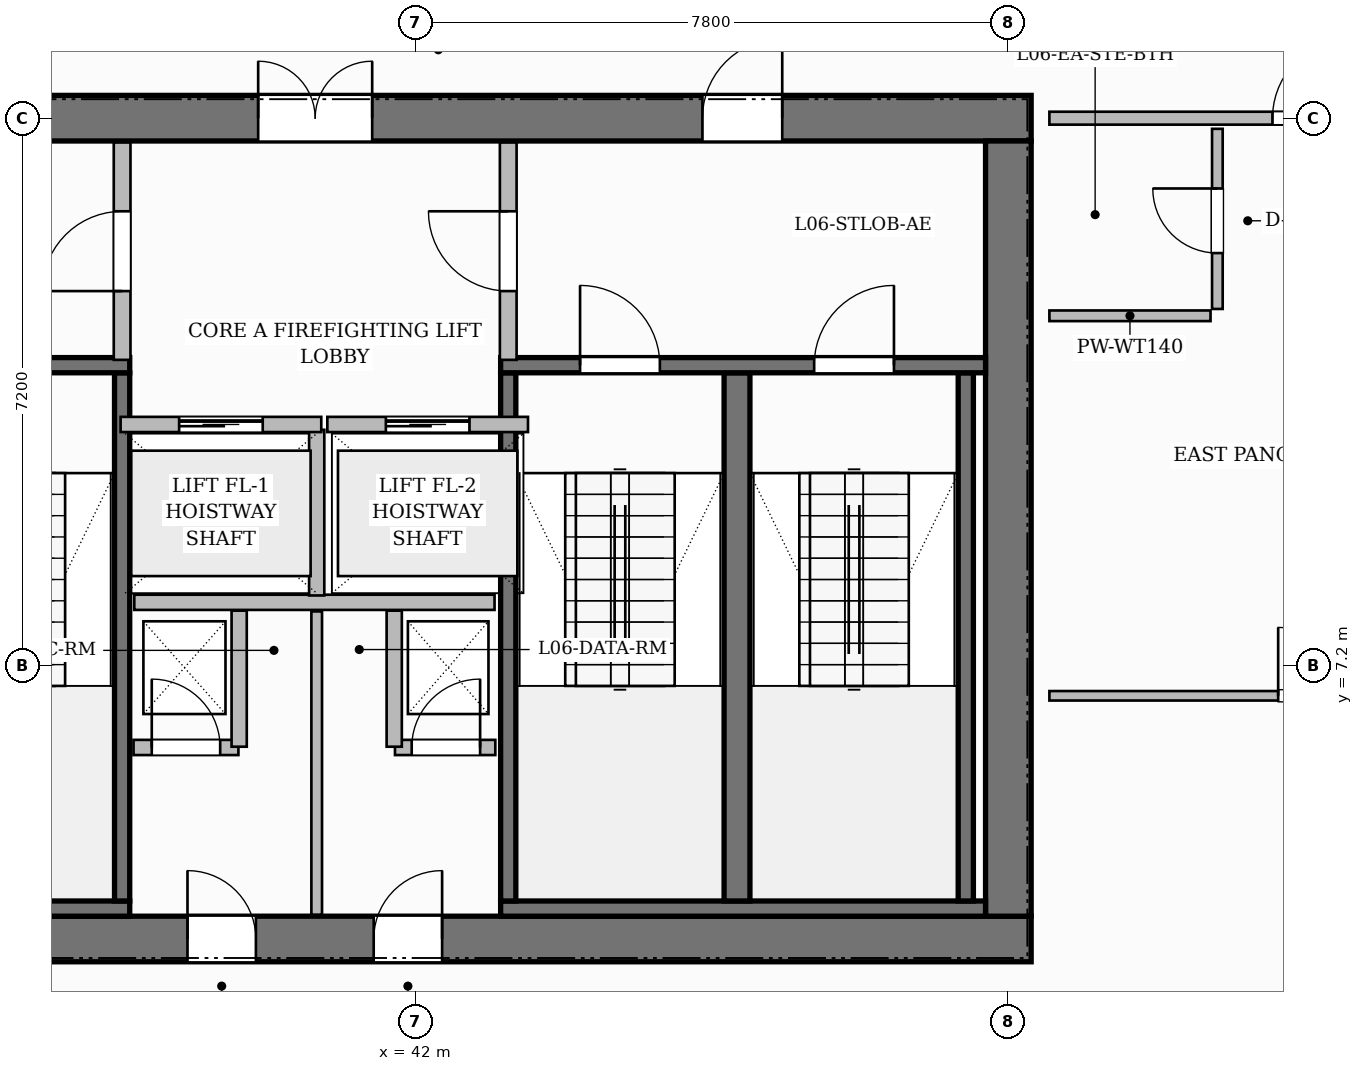
"""IFC4 building model, lengths in metres.
Left out: names, types, materials, properties, quantities, classifications, styles, units other than length and angle.
Written with IfcOpenShell. Run it as: python <this file> out.ifc"""

import sys

from ifc_helpers import new_model, si_unit, direction, frame, frame_2d, origin, place, context, subcontext, project, spatial, rectangle, extrude, source, transform, mapped, element, fill, save


model = new_model("IFC4")
c1 = context("Model", 3, precision=1e-05, world=origin(), true_north=direction((0.0, 1.0)))
c2 = subcontext(c1, "Body", "Model", "MODEL_VIEW")
j1 = project(units=[si_unit("LENGTHUNIT", "METRE"), si_unit("PLANEANGLEUNIT", "RADIAN")], contexts=[c1])
p1 = place(None, origin())
s1 = spatial("IfcSite", under=j1, at=p1, CompositionType="ELEMENT")
p2 = place(p1, origin())
s2 = spatial("IfcBuilding", under=s1, at=p2, CompositionType="ELEMENT")
p3 = place(p2, frame((0.0, 0.0, 32.4)))
s3 = spatial("IfcBuildingStorey", under=s2, at=p3, CompositionType="ELEMENT", Elevation=32.4)
p4 = place(p3, frame((34.5, 3.6, 0.0), z_axis=(0.0, 0.0, 1.0), x_axis=(1.0, 0.0, 0.0)))
e1 = element("IfcWall", 1, at=p4, inside=s3, PredefinedType="SHEAR", context=c2, shape_type="SweptSolid", body=[
    extrude(rectangle(XDim=15.6, YDim=0.6, at=frame_2d((7.8, 0.0))), origin(), (0.0, 0.0, 1.0), 3.7),
])
p5 = place(p4, frame((4.5, 0.0, 0.0)))
e2 = element("IfcOpeningElement", 2, at=p5, cuts=e1, PredefinedType="OPENING", context=c2, shape_type="SweptSolid", body=[
    extrude(rectangle(XDim=0.9, YDim=2.1, at=frame_2d((0.45, 1.05))), frame((0.0, 0.31, 0.0), z_axis=(0.0, -1.0, 0.0), x_axis=(1.0, 0.0, 0.0)), (0.0, 0.0, 1.0), 0.62),
])
p6 = place(p4, frame((6.95, 0.0, 0.0)))
e3 = element("IfcOpeningElement", 3, at=p6, cuts=e1, PredefinedType="OPENING", context=c2, shape_type="SweptSolid", body=[
    extrude(rectangle(XDim=0.9, YDim=2.1, at=frame_2d((0.45, 1.05))), frame((0.0, 0.31, 0.0), z_axis=(0.0, -1.0, 0.0), x_axis=(1.0, 0.0, 0.0)), (0.0, 0.0, 1.0), 0.62),
])
p7 = place(p3, frame((34.5, 14.4, 0.0), z_axis=(0.0, 0.0, 1.0), x_axis=(1.0, 0.0, 0.0)))
e4 = element("IfcWall", 4, at=p7, inside=s3, PredefinedType="SHEAR", context=c2, shape_type="SweptSolid", body=[
    extrude(rectangle(XDim=15.6, YDim=0.6, at=frame_2d((7.8, 0.0))), origin(), (0.0, 0.0, 1.0), 3.7),
])
p8 = place(p7, frame((5.43, 0.0, 0.0)))
e5 = element("IfcOpeningElement", 5, at=p8, cuts=e4, PredefinedType="OPENING", context=c2, shape_type="SweptSolid", body=[
    extrude(rectangle(XDim=1.5, YDim=2.2, at=frame_2d((0.75, 1.1))), frame((0.0, 0.31, 0.0), z_axis=(0.0, -1.0, 0.0), x_axis=(1.0, 0.0, 0.0)), (0.0, 0.0, 1.0), 0.62),
])
p9 = place(p7, frame((1.645, 0.0, 0.0)))
e6 = element("IfcOpeningElement", 6, at=p9, cuts=e4, PredefinedType="OPENING", context=c2, shape_type="SweptSolid", body=[
    extrude(rectangle(XDim=1.05, YDim=2.15, at=frame_2d((0.525, 1.075))), frame((0.0, 0.31, 0.0), z_axis=(0.0, -1.0, 0.0), x_axis=(1.0, 0.0, 0.0)), (0.0, 0.0, 1.0), 0.62),
])
p10 = place(p7, frame((11.275, 0.0, 0.0)))
e7 = element("IfcOpeningElement", 7, at=p10, cuts=e4, PredefinedType="OPENING", context=c2, shape_type="SweptSolid", body=[
    extrude(rectangle(XDim=1.05, YDim=2.15, at=frame_2d((0.525, 1.075))), frame((0.0, 0.31, 0.0), z_axis=(0.0, -1.0, 0.0), x_axis=(1.0, 0.0, 0.0)), (0.0, 0.0, 1.0), 0.62),
])
p11 = place(p3, frame((49.8, 3.9, 0.0), z_axis=(0.0, 0.0, 1.0), x_axis=(0.0, 1.0, 0.0)))
e8 = element("IfcWall", 8, at=p11, inside=s3, PredefinedType="SHEAR", context=c2, shape_type="SweptSolid", body=[
    extrude(rectangle(XDim=10.2, YDim=0.6, at=frame_2d((5.1, 0.0))), origin(), (0.0, 0.0, 1.0), 3.7),
])
p12 = place(p3, frame((35.1, 4.0, 0.0), z_axis=(0.0, 0.0, 1.0), x_axis=(1.0, 0.0, 0.0)))
e9 = element("IfcWall", 9, at=p12, inside=s3, PredefinedType="SHEAR", context=c2, shape_type="SweptSolid", body=[
    extrude(rectangle(XDim=3.14, YDim=0.2, at=frame_2d((1.57, 0.0))), origin(), (0.0, 0.0, 1.0), 3.7),
])
p13 = place(p3, frame((38.14, 4.1, 0.0), z_axis=(0.0, 0.0, 1.0), x_axis=(0.0, 1.0, 0.0)))
e10 = element("IfcWall", 10, at=p13, inside=s3, PredefinedType="SHEAR", context=c2, shape_type="SweptSolid", body=[
    extrude(rectangle(XDim=6.95, YDim=0.2, at=frame_2d((3.475, 0.0))), origin(), (0.0, 0.0, 1.0), 3.7),
])
p14 = place(p3, frame((35.1, 11.15, 0.0), z_axis=(0.0, 0.0, 1.0), x_axis=(1.0, 0.0, 0.0)))
e11 = element("IfcWall", 11, at=p14, inside=s3, PredefinedType="SHEAR", context=c2, shape_type="SweptSolid", body=[
    extrude(rectangle(XDim=3.14, YDim=0.2, at=frame_2d((1.57, 0.0))), origin(), (0.0, 0.0, 1.0), 3.7),
])
p15 = place(p14, frame((1.045, 0.0, 0.0)))
e12 = element("IfcOpeningElement", 12, at=p15, cuts=e11, PredefinedType="OPENING", context=c2, shape_type="SweptSolid", body=[
    extrude(rectangle(XDim=1.05, YDim=2.2, at=frame_2d((0.525, 1.1))), frame((0.0, 0.11, 0.0), z_axis=(0.0, -1.0, 0.0), x_axis=(1.0, 0.0, 0.0)), (0.0, 0.0, 1.0), 0.22),
])
p16 = place(p3, frame((43.12, 4.0, 0.0), z_axis=(0.0, 0.0, 1.0), x_axis=(1.0, 0.0, 0.0)))
e13 = element("IfcWall", 13, at=p16, inside=s3, PredefinedType="SHEAR", context=c2, shape_type="SweptSolid", body=[
    extrude(rectangle(XDim=6.38, YDim=0.2, at=frame_2d((3.19, 0.0))), origin(), (0.0, 0.0, 1.0), 3.7),
])
p17 = place(p3, frame((43.22, 4.1, 0.0), z_axis=(0.0, 0.0, 1.0), x_axis=(0.0, 1.0, 0.0)))
e14 = element("IfcWall", 14, at=p17, inside=s3, PredefinedType="SHEAR", context=c2, shape_type="SweptSolid", body=[
    extrude(rectangle(XDim=6.95, YDim=0.2, at=frame_2d((3.475, 0.0))), origin(), (0.0, 0.0, 1.0), 3.7),
])
p18 = place(p3, frame((46.23, 4.1, 0.0), z_axis=(0.0, 0.0, 1.0), x_axis=(0.0, 1.0, 0.0)))
e15 = element("IfcWall", 15, at=p18, inside=s3, PredefinedType="SHEAR", context=c2, shape_type="SweptSolid", body=[
    extrude(rectangle(XDim=6.95, YDim=0.34, at=frame_2d((3.475, 0.0))), origin(), (0.0, 0.0, 1.0), 3.7),
])
p19 = place(p3, frame((49.24, 4.1, 0.0), z_axis=(0.0, 0.0, 1.0), x_axis=(0.0, 1.0, 0.0)))
e16 = element("IfcWall", 16, at=p19, inside=s3, PredefinedType="SHEAR", context=c2, shape_type="SweptSolid", body=[
    extrude(rectangle(XDim=6.95, YDim=0.2, at=frame_2d((3.475, 0.0))), origin(), (0.0, 0.0, 1.0), 3.7),
])
p20 = place(p3, frame((43.12, 11.15, 0.0), z_axis=(0.0, 0.0, 1.0), x_axis=(1.0, 0.0, 0.0)))
e17 = element("IfcWall", 17, at=p20, inside=s3, PredefinedType="SHEAR", context=c2, shape_type="SweptSolid", body=[
    extrude(rectangle(XDim=6.38, YDim=0.2, at=frame_2d((3.19, 0.0))), origin(), (0.0, 0.0, 1.0), 3.7),
])
p21 = place(p20, frame((1.045, 0.0, 0.0)))
e18 = element("IfcOpeningElement", 18, at=p21, cuts=e17, PredefinedType="OPENING", context=c2, shape_type="SweptSolid", body=[
    extrude(rectangle(XDim=1.05, YDim=2.2, at=frame_2d((0.525, 1.1))), frame((0.0, 0.11, 0.0), z_axis=(0.0, -1.0, 0.0), x_axis=(1.0, 0.0, 0.0)), (0.0, 0.0, 1.0), 0.22),
])
p22 = place(p20, frame((4.125, 0.0, 0.0)))
e19 = element("IfcOpeningElement", 19, at=p22, cuts=e17, PredefinedType="OPENING", context=c2, shape_type="SweptSolid", body=[
    extrude(rectangle(XDim=1.05, YDim=2.2, at=frame_2d((0.525, 1.1))), frame((0.0, 0.11, 0.0), z_axis=(0.0, -1.0, 0.0), x_axis=(1.0, 0.0, 0.0)), (0.0, 0.0, 1.0), 0.22),
])
p23 = place(p3, frame((38.3, 8.03, 0.0), z_axis=(0.0, 0.0, 1.0), x_axis=(1.0, 0.0, 0.0)))
e20 = element("IfcWall", 20, at=p23, inside=s3, PredefinedType="PARTITIONING", context=c2, shape_type="SweptSolid", body=[
    extrude(rectangle(XDim=4.74, YDim=0.2, at=frame_2d((2.37, 0.0))), origin(), (0.0, 0.0, 1.0), 3.45),
])
p24 = place(p3, frame((40.7, 8.12, 0.0), z_axis=(0.0, 0.0, 1.0), x_axis=(0.0, 1.0, 0.0)))
e21 = element("IfcWall", 21, at=p24, inside=s3, PredefinedType="PARTITIONING", context=c2, shape_type="SweptSolid", body=[
    extrude(rectangle(XDim=2.18, YDim=0.2, at=frame_2d((1.09, 0.0))), origin(), (0.0, 0.0, 1.0), 3.45),
])
p25 = place(p3, frame((38.14, 11.22, 0.0), z_axis=(0.0, 0.0, 1.0), x_axis=(0.0, 1.0, 0.0)))
e22 = element("IfcWall", 22, at=p25, inside=s3, PredefinedType="PARTITIONING", context=c2, shape_type="SweptSolid", body=[
    extrude(rectangle(XDim=2.86, YDim=0.22, at=frame_2d((1.43, 0.0))), origin(), (0.0, 0.0, 1.0), 3.45),
])
p26 = place(p25, frame((0.905, 0.0, 0.0)))
e23 = element("IfcOpeningElement", 23, at=p26, cuts=e22, PredefinedType="OPENING", context=c2, shape_type="SweptSolid", body=[
    extrude(rectangle(XDim=1.05, YDim=2.15, at=frame_2d((0.525, 1.075))), frame((0.0, 0.12, 0.0), z_axis=(0.0, -1.0, 0.0), x_axis=(1.0, 0.0, 0.0)), (0.0, 0.0, 1.0), 0.24),
])
p27 = place(p3, frame((43.22, 11.22, 0.0), z_axis=(0.0, 0.0, 1.0), x_axis=(0.0, 1.0, 0.0)))
e24 = element("IfcWall", 24, at=p27, inside=s3, PredefinedType="PARTITIONING", context=c2, shape_type="SweptSolid", body=[
    extrude(rectangle(XDim=2.86, YDim=0.22, at=frame_2d((1.43, 0.0))), origin(), (0.0, 0.0, 1.0), 3.45),
])
p28 = place(p27, frame((0.905, 0.0, 0.0)))
e25 = element("IfcOpeningElement", 25, at=p28, cuts=e24, PredefinedType="OPENING", context=c2, shape_type="SweptSolid", body=[
    extrude(rectangle(XDim=1.05, YDim=2.15, at=frame_2d((0.525, 1.075))), frame((0.0, 0.12, 0.0), z_axis=(0.0, -1.0, 0.0), x_axis=(1.0, 0.0, 0.0)), (0.0, 0.0, 1.0), 0.24),
])
p29 = place(p3, frame((38.29, 6.12, 0.0), z_axis=(0.0, 0.0, 1.0), x_axis=(1.0, 0.0, 0.0)))
e26 = element("IfcWall", 26, at=p29, inside=s3, PredefinedType="PARTITIONING", context=c2, shape_type="SweptSolid", body=[
    extrude(rectangle(XDim=1.38, YDim=0.2, at=frame_2d((0.69, 0.0))), origin(), (0.0, 0.0, 1.0), 3.45),
])
p30 = place(p29, frame((0.24, 0.0, 0.0)))
e27 = element("IfcOpeningElement", 27, at=p30, cuts=e26, PredefinedType="OPENING", context=c2, shape_type="SweptSolid", body=[
    extrude(rectangle(XDim=0.9, YDim=2.1, at=frame_2d((0.45, 1.05))), frame((0.0, 0.11, 0.0), z_axis=(0.0, -1.0, 0.0), x_axis=(1.0, 0.0, 0.0)), (0.0, 0.0, 1.0), 0.22),
])
p31 = place(p3, frame((39.68, 6.13, 0.0), z_axis=(0.0, 0.0, 1.0), x_axis=(0.0, 1.0, 0.0)))
e28 = element("IfcWall", 28, at=p31, inside=s3, PredefinedType="PARTITIONING", context=c2, shape_type="SweptSolid", body=[
    extrude(rectangle(XDim=1.79, YDim=0.2, at=frame_2d((0.895, 0.0))), origin(), (0.0, 0.0, 1.0), 3.45),
])
p32 = place(p3, frame((41.73, 6.12, 0.0), z_axis=(0.0, 0.0, 1.0), x_axis=(1.0, 0.0, 0.0)))
e29 = element("IfcWall", 29, at=p32, inside=s3, PredefinedType="PARTITIONING", context=c2, shape_type="SweptSolid", body=[
    extrude(rectangle(XDim=1.32, YDim=0.2, at=frame_2d((0.66, 0.0))), origin(), (0.0, 0.0, 1.0), 3.45),
])
p33 = place(p32, frame((0.22, 0.0, 0.0)))
e30 = element("IfcOpeningElement", 30, at=p33, cuts=e29, PredefinedType="OPENING", context=c2, shape_type="SweptSolid", body=[
    extrude(rectangle(XDim=0.9, YDim=2.1, at=frame_2d((0.45, 1.05))), frame((0.0, 0.11, 0.0), z_axis=(0.0, -1.0, 0.0), x_axis=(1.0, 0.0, 0.0)), (0.0, 0.0, 1.0), 0.22),
])
p34 = place(p3, frame((41.72, 6.13, 0.0), z_axis=(0.0, 0.0, 1.0), x_axis=(0.0, 1.0, 0.0)))
e31 = element("IfcWall", 31, at=p34, inside=s3, PredefinedType="PARTITIONING", context=c2, shape_type="SweptSolid", body=[
    extrude(rectangle(XDim=1.79, YDim=0.2, at=frame_2d((0.895, 0.0))), origin(), (0.0, 0.0, 1.0), 3.45),
])
p35 = place(p3, frame((40.7, 3.92, 0.0), z_axis=(0.0, 0.0, 1.0), x_axis=(0.0, 1.0, 0.0)))
e32 = element("IfcWall", 32, at=p35, inside=s3, PredefinedType="PARTITIONING", context=c2, shape_type="SweptSolid", body=[
    extrude(rectangle(XDim=3.99, YDim=0.14, at=frame_2d((1.995, 0.0))), origin(), (0.0, 0.0, 1.0), 3.45),
])
p36 = place(p3, frame((50.34, 14.4, 0.0), z_axis=(0.0, 0.0, 1.0), x_axis=(1.0, 0.0, 0.0)))
e33 = element("IfcWall", 33, at=p36, inside=s3, PredefinedType="PARTITIONING", context=c2, shape_type="SweptSolid", body=[
    extrude(rectangle(XDim=7.07, YDim=0.17, at=frame_2d((3.535, 0.0))), origin(), (0.0, 0.0, 1.0), 2.885),
])
p37 = place(p36, frame((2.935, 0.0, 0.0)))
e34 = element("IfcOpeningElement", 34, at=p37, cuts=e33, PredefinedType="OPENING", context=c2, shape_type="SweptSolid", body=[
    extrude(rectangle(XDim=1.05, YDim=2.25, at=frame_2d((0.525, 1.125))), frame((0.0, 0.095, 0.0), z_axis=(0.0, -1.0, 0.0), x_axis=(1.0, 0.0, 0.0)), (0.0, 0.0, 1.0), 0.19),
])
p38 = place(p3, frame((52.55, 11.89, 0.0), z_axis=(0.0, 0.0, 1.0), x_axis=(0.0, 1.0, 0.0)))
e35 = element("IfcWall", 35, at=p38, inside=s3, PredefinedType="PARTITIONING", context=c2, shape_type="SweptSolid", body=[
    extrude(rectangle(XDim=2.37, YDim=0.14, at=frame_2d((1.185, 0.0))), origin(), (0.0, 0.0, 1.0), 3.45),
])
p39 = place(p38, frame((0.735, 0.0, 0.0)))
e36 = element("IfcOpeningElement", 36, at=p39, cuts=e35, PredefinedType="OPENING", context=c2, shape_type="SweptSolid", body=[
    extrude(rectangle(XDim=0.85, YDim=2.1, at=frame_2d((0.425, 1.05))), frame((0.0, 0.08, 0.0), z_axis=(0.0, -1.0, 0.0), x_axis=(1.0, 0.0, 0.0)), (0.0, 0.0, 1.0), 0.16),
])
p40 = place(p3, frame((50.34, 11.8, 0.0), z_axis=(0.0, 0.0, 1.0), x_axis=(1.0, 0.0, 0.0)))
e37 = element("IfcWall", 37, at=p40, inside=s3, PredefinedType="PARTITIONING", context=c2, shape_type="SweptSolid", body=[
    extrude(rectangle(XDim=2.12, YDim=0.14, at=frame_2d((1.06, 0.0))), origin(), (0.0, 0.0, 1.0), 3.45),
])
p41 = place(p3, frame((50.34, 6.8, 0.0), z_axis=(0.0, 0.0, 1.0), x_axis=(1.0, 0.0, 0.0)))
e38 = element("IfcWall", 38, at=p41, inside=s3, PredefinedType="PARTITIONING", context=c2, shape_type="SweptSolid", body=[
    extrude(rectangle(XDim=7.07, YDim=0.125, at=frame_2d((3.535, 0.0))), origin(), (0.0, 0.0, 1.0), 3.45),
])
p42 = place(p41, frame((3.01, 0.0, 0.0)))
e39 = element("IfcOpeningElement", 39, at=p42, cuts=e38, PredefinedType="OPENING", context=c2, shape_type="SweptSolid", body=[
    extrude(rectangle(XDim=0.9, YDim=2.15, at=frame_2d((0.45, 1.075))), frame((0.0, 0.073, 0.0), z_axis=(0.0, -1.0, 0.0), x_axis=(1.0, 0.0, 0.0)), (0.0, 0.0, 1.0), 0.145),
])
p43 = place(p3, frame((38.12, 10.37, 0.0), z_axis=(0.0, 0.0, 1.0), x_axis=(1.0, 0.0, 0.0)))
e40 = element("IfcWall", 40, at=p43, inside=s3, PredefinedType="PARTITIONING", context=c2, shape_type="SweptSolid", body=[
    extrude(rectangle(XDim=2.64, YDim=0.2, at=frame_2d((1.32, 0.0))), origin(), (0.0, 0.0, 1.0), 3.45),
])
p44 = place(p43, frame((0.77, 0.0, 0.0)))
e41 = element("IfcOpeningElement", 41, at=p44, cuts=e40, PredefinedType="OPENING", context=c2, shape_type="SweptSolid", body=[
    extrude(rectangle(XDim=1.1, YDim=2.2, at=frame_2d((0.55, 1.1))), frame((0.0, 0.11, 0.0), z_axis=(0.0, -1.0, 0.0), x_axis=(1.0, 0.0, 0.0)), (0.0, 0.0, 1.0), 0.22),
])
p45 = place(p3, frame((40.84, 10.37, 0.0), z_axis=(0.0, 0.0, 1.0), x_axis=(1.0, 0.0, 0.0)))
e42 = element("IfcWall", 42, at=p45, inside=s3, PredefinedType="PARTITIONING", context=c2, shape_type="SweptSolid", body=[
    extrude(rectangle(XDim=2.64, YDim=0.2, at=frame_2d((1.32, 0.0))), origin(), (0.0, 0.0, 1.0), 3.45),
])
p46 = place(p45, frame((0.77, 0.0, 0.0)))
e43 = element("IfcOpeningElement", 43, at=p46, cuts=e42, PredefinedType="OPENING", context=c2, shape_type="SweptSolid", body=[
    extrude(rectangle(XDim=1.1, YDim=2.2, at=frame_2d((0.55, 1.1))), frame((0.0, 0.11, 0.0), z_axis=(0.0, -1.0, 0.0), x_axis=(1.0, 0.0, 0.0)), (0.0, 0.0, 1.0), 0.22),
])
m1 = source(origin(), c2, "Body", "SweptSolid", [
    extrude(rectangle(XDim=1.05, YDim=2.2, at=frame_2d((0.525, 1.1))), frame((0.0, 0.025, 0.0), z_axis=(0.0, -1.0, 0.0), x_axis=(1.0, 0.0, 0.0)), (0.0, 0.0, 1.0), 0.05),
])
p47 = place(p21, origin())
e44 = element("IfcDoor", 44, at=p47, inside=s3, OperationType="SINGLE_SWING_LEFT", PredefinedType="DOOR", context=c2, shape_type="MappedRepresentation", body=[
    mapped(m1, transform((0.0, 0.0, 0.0), scale=1.0)),
])
fill(e18, e44)
p48 = place(p22, origin())
e45 = element("IfcDoor", 45, at=p48, inside=s3, OperationType="SINGLE_SWING_RIGHT", PredefinedType="DOOR", context=c2, shape_type="MappedRepresentation", body=[
    mapped(m1, transform((0.0, 0.0, 0.0), scale=1.0)),
])
fill(e19, e45)
m2 = source(origin(), c2, "Body", "SweptSolid", [
    extrude(rectangle(XDim=1.05, YDim=2.15, at=frame_2d((0.525, 1.075))), frame((0.0, 0.025, 0.0), z_axis=(0.0, -1.0, 0.0), x_axis=(1.0, 0.0, 0.0)), (0.0, 0.0, 1.0), 0.05),
])
p49 = place(p26, origin())
e46 = element("IfcDoor", 46, at=p49, inside=s3, OperationType="SINGLE_SWING_LEFT", PredefinedType="DOOR", context=c2, shape_type="MappedRepresentation", body=[
    mapped(m2, transform((0.0, 0.0, 0.0), scale=1.0)),
])
fill(e23, e46)
p50 = place(p28, origin())
e47 = element("IfcDoor", 47, at=p50, inside=s3, OperationType="SINGLE_SWING_RIGHT", PredefinedType="DOOR", context=c2, shape_type="MappedRepresentation", body=[
    mapped(m2, transform((0.0, 0.0, 0.0), scale=1.0)),
])
fill(e25, e47)
m3 = source(origin(), c2, "Body", "SweptSolid", [
    extrude(rectangle(XDim=1.5, YDim=2.2, at=frame_2d((0.75, 1.1))), frame((0.0, 0.025, 0.0), z_axis=(0.0, -1.0, 0.0), x_axis=(1.0, 0.0, 0.0)), (0.0, 0.0, 1.0), 0.05),
])
p51 = place(p8, origin())
e48 = element("IfcDoor", 48, at=p51, inside=s3, OperationType="DOUBLE_DOOR_SINGLE_SWING", PredefinedType="DOOR", context=c2, shape_type="MappedRepresentation", body=[
    mapped(m3, transform((0.0, 0.0, 0.0), scale=1.0)),
])
fill(e5, e48)
p52 = place(p10, origin())
e49 = element("IfcDoor", 49, at=p52, inside=s3, OperationType="SINGLE_SWING_RIGHT", PredefinedType="DOOR", context=c2, shape_type="MappedRepresentation", body=[
    mapped(m2, transform((0.0, 0.0, 0.0), scale=1.0)),
])
fill(e7, e49)
m4 = source(origin(), c2, "Body", "SweptSolid", [
    extrude(rectangle(XDim=0.9, YDim=2.1, at=frame_2d((0.45, 1.05))), frame((0.0, 0.025, 0.0), z_axis=(0.0, -1.0, 0.0), x_axis=(1.0, 0.0, 0.0)), (0.0, 0.0, 1.0), 0.05),
])
p53 = place(p30, origin())
e50 = element("IfcDoor", 50, at=p53, inside=s3, OperationType="SINGLE_SWING_LEFT", PredefinedType="DOOR", context=c2, shape_type="MappedRepresentation", body=[
    mapped(m4, transform((0.0, 0.0, 0.0), scale=1.0)),
])
fill(e27, e50)
p54 = place(p33, origin())
e51 = element("IfcDoor", 51, at=p54, inside=s3, OperationType="SINGLE_SWING_RIGHT", PredefinedType="DOOR", context=c2, shape_type="MappedRepresentation", body=[
    mapped(m4, transform((0.0, 0.0, 0.0), scale=1.0)),
])
fill(e30, e51)
p55 = place(p5, origin())
e52 = element("IfcDoor", 52, at=p55, inside=s3, OperationType="SINGLE_SWING_LEFT", PredefinedType="DOOR", context=c2, shape_type="MappedRepresentation", body=[
    mapped(m4, transform((0.0, 0.0, 0.0), scale=1.0)),
])
fill(e2, e52)
p56 = place(p6, origin())
e53 = element("IfcDoor", 53, at=p56, inside=s3, OperationType="SINGLE_SWING_RIGHT", PredefinedType="DOOR", context=c2, shape_type="MappedRepresentation", body=[
    mapped(m4, transform((0.0, 0.0, 0.0), scale=1.0)),
])
fill(e3, e53)
m5 = source(origin(), c2, "Body", "SweptSolid", [
    extrude(rectangle(XDim=1.05, YDim=2.25, at=frame_2d((0.525, 1.125))), frame((0.0, 0.025, 0.0), z_axis=(0.0, -1.0, 0.0), x_axis=(1.0, 0.0, 0.0)), (0.0, 0.0, 1.0), 0.05),
])
p57 = place(p37, origin())
e54 = element("IfcDoor", 54, at=p57, inside=s3, OperationType="SINGLE_SWING_RIGHT", PredefinedType="DOOR", context=c2, shape_type="MappedRepresentation", body=[
    mapped(m5, transform((0.0, 0.0, 0.0), scale=1.0)),
])
fill(e34, e54)
m6 = source(origin(), c2, "Body", "SweptSolid", [
    extrude(rectangle(XDim=0.85, YDim=2.1, at=frame_2d((0.425, 1.05))), frame((0.0, 0.025, 0.0), z_axis=(0.0, -1.0, 0.0), x_axis=(1.0, 0.0, 0.0)), (0.0, 0.0, 1.0), 0.05),
])
p58 = place(p39, origin())
e55 = element("IfcDoor", 55, at=p58, inside=s3, OperationType="SINGLE_SWING_RIGHT", PredefinedType="DOOR", context=c2, shape_type="MappedRepresentation", body=[
    mapped(m6, transform((0.0, 0.0, 0.0), scale=1.0)),
])
fill(e36, e55)
m7 = source(origin(), c2, "Body", "SweptSolid", [
    extrude(rectangle(XDim=0.9, YDim=2.15, at=frame_2d((0.45, 1.075))), frame((0.0, 0.025, 0.0), z_axis=(0.0, -1.0, 0.0), x_axis=(1.0, 0.0, 0.0)), (0.0, 0.0, 1.0), 0.05),
])
p59 = place(p42, origin())
e56 = element("IfcDoor", 56, at=p59, inside=s3, OperationType="SINGLE_SWING_LEFT", PredefinedType="DOOR", context=c2, shape_type="MappedRepresentation", body=[
    mapped(m7, transform((0.0, 0.0, 0.0), scale=1.0)),
])
fill(e39, e56)
m8 = source(origin(), c2, "Body", "SweptSolid", [
    extrude(rectangle(XDim=1.1, YDim=2.2, at=frame_2d((0.55, 1.1))), frame((0.0, 0.025, 0.0), z_axis=(0.0, -1.0, 0.0), x_axis=(1.0, 0.0, 0.0)), (0.0, 0.0, 1.0), 0.05),
])
p60 = place(p44, origin())
e57 = element("IfcDoor", 57, at=p60, inside=s3, OperationType="SLIDING_TO_LEFT", PredefinedType="DOOR", context=c2, shape_type="MappedRepresentation", body=[
    mapped(m8, transform((0.0, 0.0, 0.0), scale=1.0)),
])
fill(e41, e57)
p61 = place(p46, origin())
e58 = element("IfcDoor", 58, at=p61, inside=s3, OperationType="SLIDING_TO_LEFT", PredefinedType="DOOR", context=c2, shape_type="MappedRepresentation", body=[
    mapped(m8, transform((0.0, 0.0, 0.0), scale=1.0)),
])
fill(e43, e58)
save(model, sys.argv[1])
